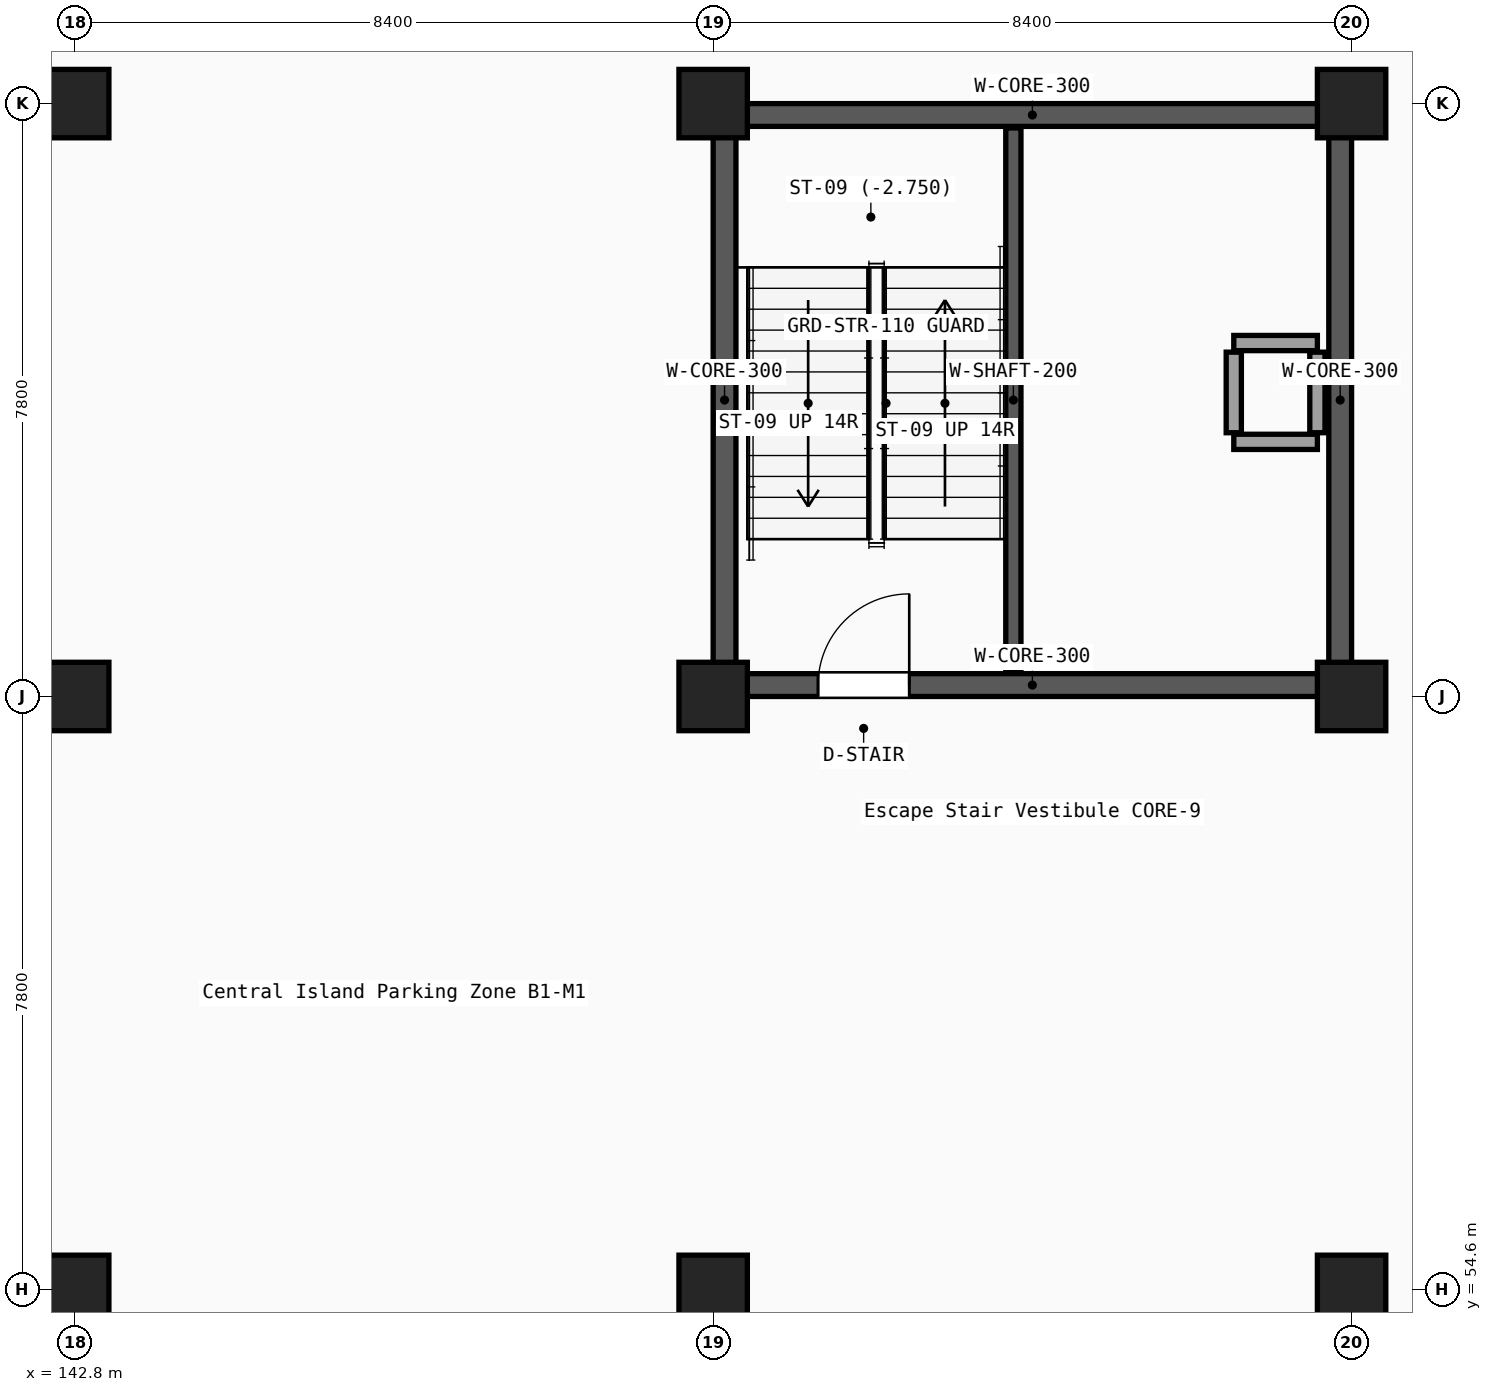
"""IFC4 building model, lengths in metres.
Left out: names, types, materials, properties, quantities, classifications, styles, units other than length and angle.
Written with IfcOpenShell. Run it as: python <this file> out.ifc"""

import sys

from ifc_helpers import new_model, si_unit, direction, frame, frame_2d, origin, origin_2d, place, context, subcontext, project, spatial, rectangle, extrude, element, fill, save


model = new_model("IFC4")
c1 = context("Model", 3, precision=1e-05, world=origin(), true_north=direction((0.0, 1.0)))
c2 = subcontext(c1, "Body", "Model", "MODEL_VIEW")
j1 = project(units=[si_unit("LENGTHUNIT", "METRE"), si_unit("PLANEANGLEUNIT", "RADIAN")], contexts=[c1])
p1 = place(None, origin())
s1 = spatial("IfcSite", under=j1, at=p1, CompositionType="ELEMENT")
p2 = place(p1, origin())
s2 = spatial("IfcBuilding", under=s1, at=p2, CompositionType="ELEMENT")
p3 = place(p2, frame((0.0, 0.0, -5.1)))
s3 = spatial("IfcBuildingStorey", under=s2, at=p3, CompositionType="ELEMENT", Elevation=-5.1)
for number, where, z_axis, x_axis in (
    (1, (142.8, 54.6, -0.22), (0.0, 0.0, 1.0), (1.0, 0.0, 0.0)),
    (2, (142.8, 62.4, -0.22), (0.0, 0.0, 1.0), (1.0, 0.0, 0.0)),
    (3, (142.8, 70.2, -0.22), (0.0, 0.0, 1.0), (1.0, 0.0, 0.0)),
    (4, (151.2, 54.6, -0.22), (0.0, 0.0, 1.0), (1.0, 0.0, 0.0)),
    (5, (151.2, 62.4, -0.22), (0.0, 0.0, 1.0), (1.0, 0.0, 0.0)),
    (6, (151.2, 70.2, -0.22), (0.0, 0.0, 1.0), (1.0, 0.0, 0.0)),
    (7, (159.6, 54.6, -0.22), (0.0, 0.0, 1.0), (1.0, 0.0, 0.0)),
    (8, (159.6, 62.4, -0.22), (0.0, 0.0, 1.0), (1.0, 0.0, 0.0)),
    (9, (159.6, 70.2, -0.22), (0.0, 0.0, 1.0), (1.0, 0.0, 0.0)),
):
    element("IfcColumn", number, at=place(p3, frame(where, z_axis=z_axis, x_axis=x_axis)), inside=s3, PredefinedType="COLUMN", context=c2, shape_type="SweptSolid", body=[
        extrude(rectangle(XDim=0.9, YDim=0.9, at=origin_2d()), origin(), (0.0, 0.0, 1.0), 5.32),
    ])
p4 = place(p3, frame((151.2, 62.55, -0.22), z_axis=(0.0, 0.0, 1.0), x_axis=(1.0, 0.0, 0.0)))
e10 = element("IfcWall", 10, at=p4, inside=s3, PredefinedType="SHEAR", context=c2, shape_type="SweptSolid", body=[
    extrude(rectangle(XDim=8.4, YDim=0.3, at=frame_2d((4.2, 0.0))), origin(), (0.0, 0.0, 1.0), 5.07),
])
p5 = place(p4, frame((1.38, 0.0, 0.22)))
e11 = element("IfcOpeningElement", 11, at=p5, cuts=e10, PredefinedType="OPENING", context=c2, shape_type="SweptSolid", body=[
    extrude(rectangle(XDim=1.2, YDim=2.15, at=frame_2d((0.6, 1.075))), frame((0.0, 0.16, 0.0), z_axis=(0.0, -1.0, 0.0), x_axis=(1.0, 0.0, 0.0)), (0.0, 0.0, 1.0), 0.32),
])
p6 = place(p3, frame((151.2, 70.05, -0.22), z_axis=(0.0, 0.0, 1.0), x_axis=(1.0, 0.0, 0.0)))
e12 = element("IfcWall", 12, at=p6, inside=s3, PredefinedType="SHEAR", context=c2, shape_type="SweptSolid", body=[
    extrude(rectangle(XDim=8.4, YDim=0.3, at=frame_2d((4.2, 0.0))), origin(), (0.0, 0.0, 1.0), 5.07),
])
for number, where, z_axis, x_axis in (
    (13, (151.35, 62.7, -0.22), (0.0, 0.0, 1.0), (0.0, 1.0, 0.0)),
    (14, (159.45, 62.7, -0.22), (0.0, 0.0, 1.0), (0.0, 1.0, 0.0)),
):
    element("IfcWall", number, at=place(p3, frame(where, z_axis=z_axis, x_axis=x_axis)), inside=s3, PredefinedType="SHEAR", context=c2, shape_type="SweptSolid", body=[
        extrude(rectangle(XDim=7.2, YDim=0.3, at=frame_2d((3.6, 0.0))), origin(), (0.0, 0.0, 1.0), 5.07),
    ])
p7 = place(p3, frame((155.15, 62.72, -0.22), z_axis=(0.0, 0.0, 1.0), x_axis=(0.0, 1.0, 0.0)))
e15 = element("IfcWall", 15, at=p7, inside=s3, PredefinedType="SHEAR", context=c2, shape_type="SweptSolid", body=[
    extrude(rectangle(XDim=7.16, YDim=0.2, at=frame_2d((3.58, 0.0))), origin(), (0.0, 0.0, 1.0), 5.07),
])
for number, where, z_axis, x_axis in (
    (16, (158.05, 65.75, 0.0), (0.0, 0.0, 1.0), (1.0, 0.0, 0.0)),
    (17, (158.05, 67.05, 0.0), (0.0, 0.0, 1.0), (1.0, 0.0, 0.0)),
):
    element("IfcWall", number, at=place(p3, frame(where, z_axis=z_axis, x_axis=x_axis)), inside=s3, PredefinedType="PARTITIONING", context=c2, shape_type="SweptSolid", body=[
        extrude(rectangle(XDim=1.1, YDim=0.2, at=frame_2d((0.55, 0.0))), origin(), (0.0, 0.0, 1.0), 4.33),
    ])
for number, where, z_axis, x_axis in (
    (18, (158.05, 65.87, 0.0), (0.0, 0.0, 1.0), (0.0, 1.0, 0.0)),
    (19, (159.15, 65.87, 0.0), (0.0, 0.0, 1.0), (0.0, 1.0, 0.0)),
):
    element("IfcWall", number, at=place(p3, frame(where, z_axis=z_axis, x_axis=x_axis)), inside=s3, PredefinedType="PARTITIONING", context=c2, shape_type="SweptSolid", body=[
        extrude(rectangle(XDim=1.06, YDim=0.2, at=frame_2d((0.53, 0.0))), origin(), (0.0, 0.0, 1.0), 4.33),
    ])
p8 = place(p5, origin())
e20 = element("IfcDoor", 20, at=p8, inside=s3, OperationType="SINGLE_SWING_RIGHT", PredefinedType="DOOR", context=c2, shape_type="SweptSolid", body=[
    extrude(rectangle(XDim=1.2, YDim=2.15, at=frame_2d((0.6, 1.075))), frame((0.0, 0.025, 0.0), z_axis=(0.0, -1.0, 0.0), x_axis=(1.0, 0.0, 0.0)), (0.0, 0.0, 1.0), 0.05),
])
fill(e11, e20)
save(model, sys.argv[1])
